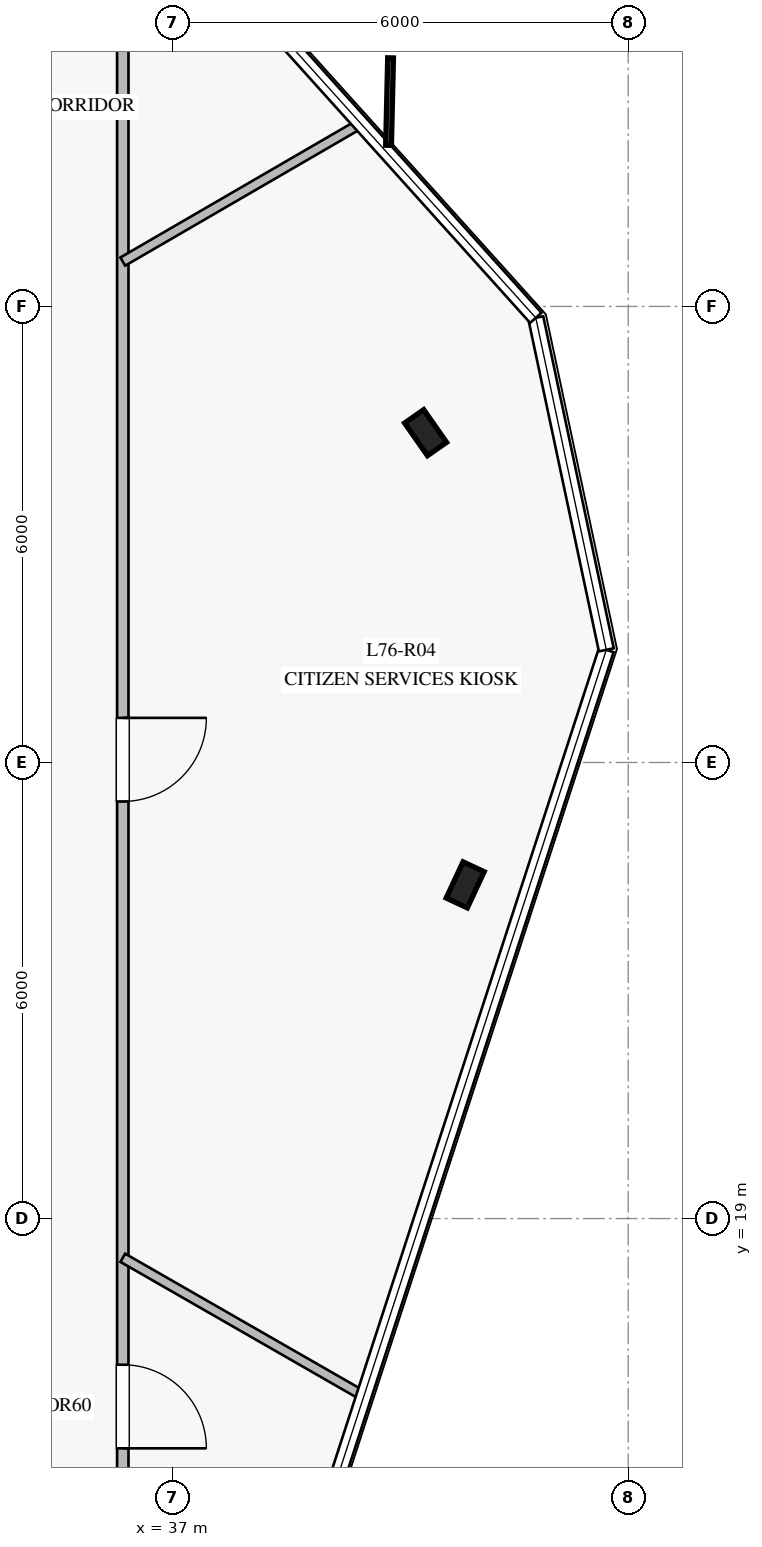
"""IFC4 building model, lengths in metres.
Left out: names, types, materials, properties, quantities, classifications, styles, units other than length and angle.
Written with IfcOpenShell. Run it as: python <this file> out.ifc"""

import sys

from ifc_helpers import new_model, si_unit, direction, frame, frame_2d, origin, origin_2d, place, context, subcontext, project, spatial, rectangle, i_section, extrude, element, fill, save


model = new_model("IFC4")
c1 = context("Model", 3, precision=1e-05, world=origin(), true_north=direction((0.0, 1.0)))
c2 = subcontext(c1, "Body", "Model", "MODEL_VIEW")
j1 = project(units=[si_unit("LENGTHUNIT", "METRE"), si_unit("PLANEANGLEUNIT", "RADIAN")], contexts=[c1])
p1 = place(None, origin())
s1 = spatial("IfcSite", under=j1, at=p1, CompositionType="ELEMENT")
p2 = place(p1, origin())
s2 = spatial("IfcBuilding", under=s1, at=p2, CompositionType="ELEMENT")
p3 = place(p2, frame((0.0, 0.0, 314.2)))
s3 = spatial("IfcBuildingStorey", under=s2, at=p3, CompositionType="ELEMENT", Elevation=314.2)
for number, where, z_axis, x_axis in (
    (1, (40.855, 23.39, 0.0), (0.0, 0.0, 1.0), (0.423, 0.906, 0.0)),
    (2, (40.334, 29.339, 0.0), (0.0, 0.0, 1.0), (-0.574, 0.819, 0.0)),
):
    element("IfcColumn", number, at=place(p3, frame(where, z_axis=z_axis, x_axis=x_axis)), inside=s3, PredefinedType="COLUMN", context=c2, shape_type="SweptSolid", body=[
        extrude(i_section(OverallWidth=0.306, OverallDepth=0.524, WebThickness=0.021, FlangeThickness=0.04, at=origin_2d()), origin(), (0.0, 0.0, 1.0), 4.0),
    ])
p4 = place(p3, frame((36.35, 35.75, 0.0), z_axis=(0.0, 0.0, 1.0), x_axis=(0.0, -1.0, 0.0)))
e3 = element("IfcWall", 3, at=p4, inside=s3, PredefinedType="PARTITIONING", context=c2, shape_type="SweptSolid", body=[
    extrude(rectangle(XDim=21.5, YDim=0.15, at=frame_2d((10.75, 0.0))), origin(), (0.0, 0.0, 1.0), 3.24),
])
p5 = place(p4, frame((18.673, 0.0, 0.0)))
e4 = element("IfcOpeningElement", 4, at=p5, cuts=e3, PredefinedType="OPENING", context=c2, shape_type="SweptSolid", body=[
    extrude(rectangle(XDim=1.1, YDim=2.2, at=frame_2d((0.55, 1.1))), frame((0.0, 0.085, 0.0), z_axis=(0.0, -1.0, 0.0), x_axis=(1.0, 0.0, 0.0)), (0.0, 0.0, 1.0), 0.17),
])
p6 = place(p4, frame((10.163, 0.0, 0.0)))
e5 = element("IfcOpeningElement", 5, at=p6, cuts=e3, PredefinedType="OPENING", context=c2, shape_type="SweptSolid", body=[
    extrude(rectangle(XDim=1.1, YDim=2.2, at=frame_2d((0.55, 1.1))), frame((0.0, 0.085, 0.0), z_axis=(0.0, -1.0, 0.0), x_axis=(1.0, 0.0, 0.0)), (0.0, 0.0, 1.0), 0.17),
])
p7 = place(p3, frame((36.35, 18.484, 0.0), z_axis=(0.0, 0.0, 1.0), x_axis=(0.867242910884, -0.497885261401, 0.0)))
e6 = element("IfcWall", 6, at=p7, inside=s3, PredefinedType="PARTITIONING", context=c2, shape_type="SweptSolid", body=[
    extrude(rectangle(XDim=3.641, YDim=0.125, at=frame_2d((1.821, 0.0))), origin(), (0.0, 0.0, 1.0), 3.24),
])
p8 = place(p3, frame((36.35, 31.59, 0.0), z_axis=(0.0, 0.0, 1.0), x_axis=(0.864909440523, 0.50192794273, 0.0)))
e7 = element("IfcWall", 7, at=p8, inside=s3, PredefinedType="PARTITIONING", context=c2, shape_type="SweptSolid", body=[
    extrude(rectangle(XDim=3.604, YDim=0.125, at=frame_2d((1.802, 0.0))), origin(), (0.0, 0.0, 1.0), 3.24),
])
p9 = place(p5, origin())
e8 = element("IfcDoor", 8, at=p9, inside=s3, OperationType="SINGLE_SWING_RIGHT", PredefinedType="DOOR", context=c2, shape_type="SweptSolid", body=[
    extrude(rectangle(XDim=1.1, YDim=2.2, at=frame_2d((0.55, 1.1))), frame((0.0, 0.025, 0.0), z_axis=(0.0, -1.0, 0.0), x_axis=(1.0, 0.0, 0.0)), (0.0, 0.0, 1.0), 0.05),
])
fill(e4, e8)
p10 = place(p6, origin())
e9 = element("IfcDoor", 9, at=p10, inside=s3, OperationType="SINGLE_SWING_LEFT", PredefinedType="DOOR", context=c2, shape_type="SweptSolid", body=[
    extrude(rectangle(XDim=1.1, YDim=2.2, at=frame_2d((0.55, 1.1))), frame((0.0, 0.025, 0.0), z_axis=(0.0, -1.0, 0.0), x_axis=(1.0, 0.0, 0.0)), (0.0, 0.0, 1.0), 0.05),
])
fill(e5, e9)
save(model, sys.argv[1])
